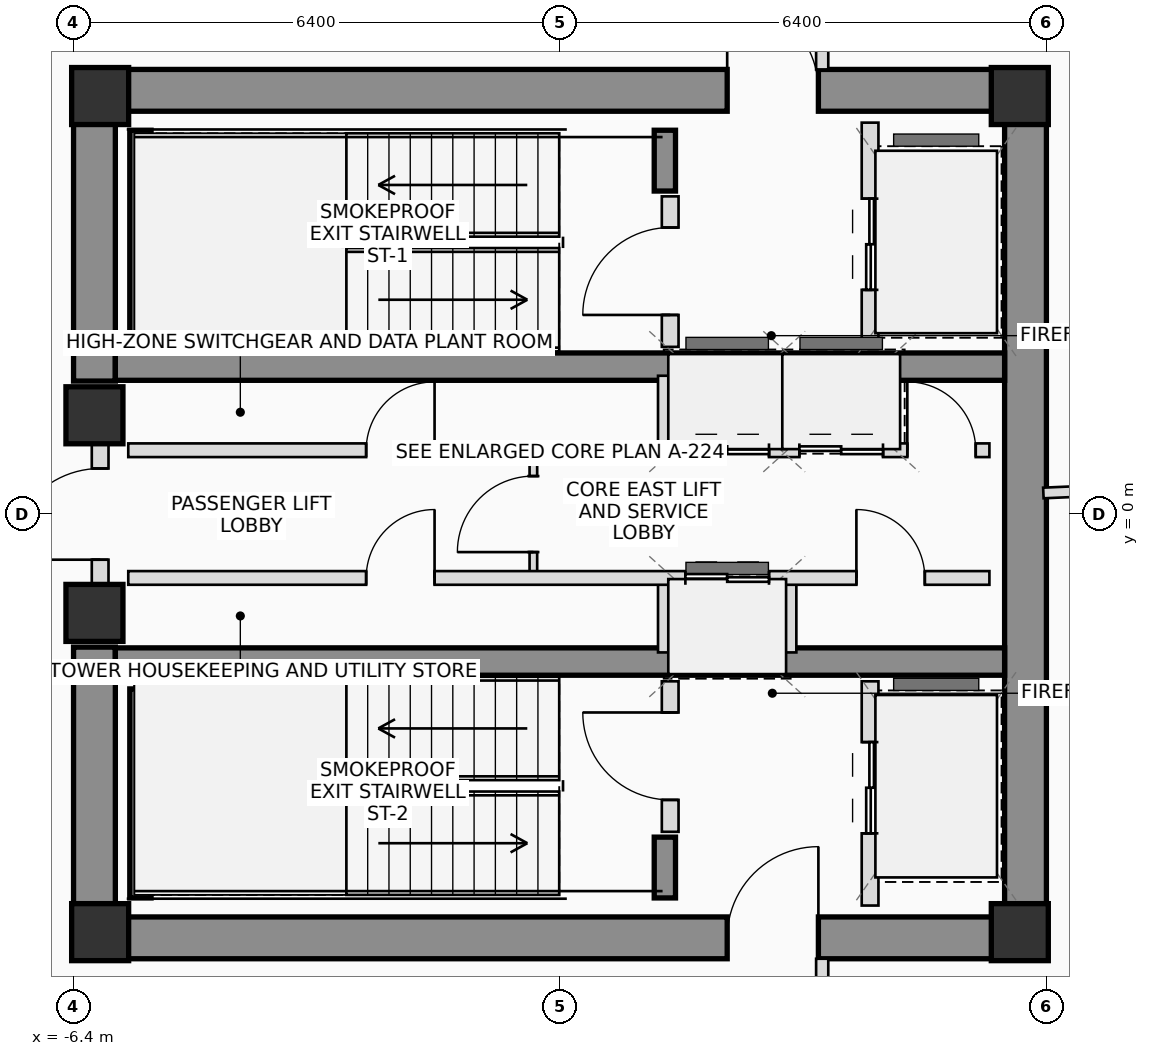
"""IFC4 building model, lengths in metres.
Left out: names, types, materials, properties, quantities, classifications, styles, units other than length and angle.
Written with IfcOpenShell. Run it as: python <this file> out.ifc"""

import sys

from ifc_helpers import new_model, si_unit, direction, frame, frame_2d, origin, origin_2d, place, context, subcontext, project, spatial, rectangle, extrude, source, transform, mapped, element, fill, save


model = new_model("IFC4")
c1 = context("Model", 3, precision=1e-05, world=origin(), true_north=direction((0.0, 1.0)))
c2 = subcontext(c1, "Body", "Model", "MODEL_VIEW")
j1 = project(units=[si_unit("LENGTHUNIT", "METRE"), si_unit("PLANEANGLEUNIT", "RADIAN")], contexts=[c1])
p1 = place(None, origin())
s1 = spatial("IfcSite", under=j1, at=p1, CompositionType="ELEMENT")
p2 = place(p1, origin())
s2 = spatial("IfcBuilding", under=s1, at=p2, CompositionType="ELEMENT")
p3 = place(p2, frame((0.0, 0.0, 264.35)))
s3 = spatial("IfcBuildingStorey", under=s2, at=p3, CompositionType="ELEMENT", Elevation=264.35)
m1 = source(origin(), c2, "Body", "SweptSolid", [
    extrude(rectangle(XDim=0.75, YDim=0.75, at=origin_2d()), origin(), (0.0, 0.0, 1.0), 3.4),
])
for number, where, z_axis, x_axis in (
    (1, (-6.05, -5.5, 0.0), (0.0, 0.0, 1.0), (1.0, 0.0, 0.0)),
    (2, (6.05, -5.5, 0.0), (0.0, 0.0, 1.0), (1.0, 0.0, 0.0)),
    (3, (6.05, 5.5, 0.0), (0.0, 0.0, 1.0), (1.0, 0.0, 0.0)),
    (4, (-6.05, 5.5, 0.0), (0.0, 0.0, 1.0), (1.0, 0.0, 0.0)),
):
    element("IfcColumn", number, at=place(p3, frame(where, z_axis=z_axis, x_axis=x_axis)), inside=s3, PredefinedType="COLUMN", context=c2, shape_type="MappedRepresentation", body=[
        mapped(m1, transform((0.0, 0.0, 0.0), scale=1.0)),
    ])
p4 = place(p3, frame((-6.4, 5.575, 0.0), z_axis=(0.0, 0.0, 1.0), x_axis=(1.0, 0.0, 0.0)))
e5 = element("IfcWall", 5, at=p4, inside=s3, PredefinedType="SHEAR", context=c2, shape_type="SweptSolid", body=[
    extrude(rectangle(XDim=12.8, YDim=0.55, at=frame_2d((6.4, 0.0))), origin(), (0.0, 0.0, 1.0), 3.4),
])
p5 = place(p4, frame((8.6, 0.0, 0.0)))
e6 = element("IfcOpeningElement", 6, at=p5, cuts=e5, PredefinedType="OPENING", context=c2, shape_type="SweptSolid", body=[
    extrude(rectangle(XDim=1.2, YDim=2.2, at=frame_2d((0.6, 1.1))), frame((0.0, 0.285, 0.0), z_axis=(0.0, -1.0, 0.0), x_axis=(1.0, 0.0, 0.0)), (0.0, 0.0, 1.0), 0.57),
])
p6 = place(p3, frame((-6.4, -5.575, 0.0), z_axis=(0.0, 0.0, 1.0), x_axis=(1.0, 0.0, 0.0)))
e7 = element("IfcWall", 7, at=p6, inside=s3, PredefinedType="SHEAR", context=c2, shape_type="SweptSolid", body=[
    extrude(rectangle(XDim=12.8, YDim=0.55, at=frame_2d((6.4, 0.0))), origin(), (0.0, 0.0, 1.0), 3.4),
])
p7 = place(p6, frame((8.6, 0.0, 0.0)))
e8 = element("IfcOpeningElement", 8, at=p7, cuts=e7, PredefinedType="OPENING", context=c2, shape_type="SweptSolid", body=[
    extrude(rectangle(XDim=1.2, YDim=2.2, at=frame_2d((0.6, 1.1))), frame((0.0, 0.285, 0.0), z_axis=(0.0, -1.0, 0.0), x_axis=(1.0, 0.0, 0.0)), (0.0, 0.0, 1.0), 0.57),
])
p8 = place(p3, frame((6.125, -5.3, 0.0), z_axis=(0.0, 0.0, 1.0), x_axis=(0.0, 1.0, 0.0)))
e9 = element("IfcWall", 9, at=p8, inside=s3, PredefinedType="SHEAR", context=c2, shape_type="SweptSolid", body=[
    extrude(rectangle(XDim=10.6, YDim=0.55, at=frame_2d((5.3, 0.0))), origin(), (0.0, 0.0, 1.0), 3.4),
])
for number, where, z_axis, x_axis in (
    (10, (-6.125, -5.3, 0.0), (0.0, 0.0, 1.0), (0.0, 1.0, 0.0)),
    (11, (-6.125, 1.75, 0.0), (0.0, 0.0, 1.0), (0.0, 1.0, 0.0)),
):
    element("IfcWall", number, at=place(p3, frame(where, z_axis=z_axis, x_axis=x_axis)), inside=s3, PredefinedType="SHEAR", context=c2, shape_type="SweptSolid", body=[
        extrude(rectangle(XDim=3.55, YDim=0.55, at=frame_2d((1.775, 0.0))), origin(), (0.0, 0.0, 1.0), 3.4),
    ])
for number, where, z_axis, x_axis in (
    (12, (-5.85, 1.94, 0.0), (0.0, 0.0, 1.0), (1.0, 0.0, 0.0)),
    (13, (-5.85, -1.94, 0.0), (0.0, 0.0, 1.0), (1.0, 0.0, 0.0)),
):
    element("IfcWall", number, at=place(p3, frame(where, z_axis=z_axis, x_axis=x_axis)), inside=s3, PredefinedType="SHEAR", context=c2, shape_type="SweptSolid", body=[
        extrude(rectangle(XDim=11.7, YDim=0.36, at=frame_2d((5.85, 0.0))), origin(), (0.0, 0.0, 1.0), 3.4),
    ])
p9 = place(p3, frame((-5.52, 2.3, 0.0), z_axis=(0.0, 0.0, 1.0), x_axis=(0.0, 1.0, 0.0)))
e14 = element("IfcWall", 14, at=p9, inside=s3, PredefinedType="SHEAR", context=c2, shape_type="SweptSolid", body=[
    extrude(rectangle(XDim=2.75, YDim=0.28, at=frame_2d((1.375, 0.0))), origin(), (0.0, 0.0, 1.0), 3.4),
])
p10 = place(p3, frame((1.38, 4.25, 0.0), z_axis=(0.0, 0.0, 1.0), x_axis=(0.0, 1.0, 0.0)))
e15 = element("IfcWall", 15, at=p10, inside=s3, PredefinedType="SHEAR", context=c2, shape_type="SweptSolid", body=[
    extrude(rectangle(XDim=0.8, YDim=0.28, at=frame_2d((0.4, 0.0))), origin(), (0.0, 0.0, 1.0), 3.4),
])
p11 = place(p3, frame((-5.52, -5.05, 0.0), z_axis=(0.0, 0.0, 1.0), x_axis=(0.0, 1.0, 0.0)))
e16 = element("IfcWall", 16, at=p11, inside=s3, PredefinedType="SHEAR", context=c2, shape_type="SweptSolid", body=[
    extrude(rectangle(XDim=2.75, YDim=0.28, at=frame_2d((1.375, 0.0))), origin(), (0.0, 0.0, 1.0), 3.4),
])
p12 = place(p3, frame((1.38, -5.05, 0.0), z_axis=(0.0, 0.0, 1.0), x_axis=(0.0, 1.0, 0.0)))
e17 = element("IfcWall", 17, at=p12, inside=s3, PredefinedType="SHEAR", context=c2, shape_type="SweptSolid", body=[
    extrude(rectangle(XDim=0.8, YDim=0.28, at=frame_2d((0.4, 0.0))), origin(), (0.0, 0.0, 1.0), 3.4),
])
for number, where, z_axis, x_axis in (
    (18, (-6.125, -1.3, 0.0), (0.0, 0.0, 1.0), (1.0, 0.0, 0.0)),
    (19, (-6.125, 1.3, 0.0), (0.0, 0.0, 1.0), (1.0, 0.0, 0.0)),
):
    element("IfcColumn", number, at=place(p3, frame(where, z_axis=z_axis, x_axis=x_axis)), inside=s3, PredefinedType="COLUMN", context=c2, shape_type="MappedRepresentation", body=[
        mapped(m1, transform((0.0, 0.0, 0.0), scale=1.0)),
    ])
p13 = place(p3, frame((-6.05, -0.95, 0.0), z_axis=(0.0, 0.0, 1.0), x_axis=(0.0, 1.0, 0.0)))
e20 = element("IfcWall", 20, at=p13, inside=s3, PredefinedType="PLUMBINGWALL", context=c2, shape_type="SweptSolid", body=[
    extrude(rectangle(XDim=1.9, YDim=0.22, at=frame_2d((0.95, 0.0))), origin(), (0.0, 0.0, 1.0), 2.18),
])
p14 = place(p13, frame((0.35, 0.0, 0.0)))
e21 = element("IfcOpeningElement", 21, at=p14, cuts=e20, PredefinedType="OPENING", context=c2, shape_type="SweptSolid", body=[
    extrude(rectangle(XDim=1.2, YDim=2.2, at=frame_2d((0.6, 1.1))), frame((0.0, 0.12, 0.0), z_axis=(0.0, -1.0, 0.0), x_axis=(1.0, 0.0, 0.0)), (0.0, 0.0, 1.0), 0.24),
])
p15 = place(p3, frame((1.45, 2.2, 0.0), z_axis=(0.0, 0.0, 1.0), x_axis=(0.0, 1.0, 0.0)))
e22 = element("IfcWall", 22, at=p15, inside=s3, PredefinedType="PLUMBINGWALL", context=c2, shape_type="SweptSolid", body=[
    extrude(rectangle(XDim=1.98, YDim=0.22, at=frame_2d((0.99, 0.0))), origin(), (0.0, 0.0, 1.0), 3.2),
])
p16 = place(p15, frame((0.42, 0.0, 0.0)))
e23 = element("IfcOpeningElement", 23, at=p16, cuts=e22, PredefinedType="OPENING", context=c2, shape_type="SweptSolid", body=[
    extrude(rectangle(XDim=1.15, YDim=2.15, at=frame_2d((0.575, 1.075))), frame((0.0, 0.12, 0.0), z_axis=(0.0, -1.0, 0.0), x_axis=(1.0, 0.0, 0.0)), (0.0, 0.0, 1.0), 0.24),
])
p17 = place(p3, frame((4.08, 2.2, 0.0), z_axis=(0.0, 0.0, 1.0), x_axis=(0.0, 1.0, 0.0)))
e24 = element("IfcWall", 24, at=p17, inside=s3, PredefinedType="PLUMBINGWALL", context=c2, shape_type="SweptSolid", body=[
    extrude(rectangle(XDim=2.95, YDim=0.22, at=frame_2d((1.475, 0.0))), origin(), (0.0, 0.0, 1.0), 3.2),
])
p18 = place(p17, frame((0.75, 0.0, 0.0)))
e25 = element("IfcOpeningElement", 25, at=p18, cuts=e24, PredefinedType="OPENING", context=c2, shape_type="SweptSolid", body=[
    extrude(rectangle(XDim=1.2, YDim=2.25, at=frame_2d((0.6, 1.125))), frame((0.0, 0.12, 0.0), z_axis=(0.0, -1.0, 0.0), x_axis=(1.0, 0.0, 0.0)), (0.0, 0.0, 1.0), 0.24),
])
p19 = place(p3, frame((1.45, -4.18, 0.0), z_axis=(0.0, 0.0, 1.0), x_axis=(0.0, 1.0, 0.0)))
e26 = element("IfcWall", 26, at=p19, inside=s3, PredefinedType="PLUMBINGWALL", context=c2, shape_type="SweptSolid", body=[
    extrude(rectangle(XDim=1.98, YDim=0.22, at=frame_2d((0.99, 0.0))), origin(), (0.0, 0.0, 1.0), 3.2),
])
p20 = place(p19, frame((0.42, 0.0, 0.0)))
e27 = element("IfcOpeningElement", 27, at=p20, cuts=e26, PredefinedType="OPENING", context=c2, shape_type="SweptSolid", body=[
    extrude(rectangle(XDim=1.15, YDim=2.15, at=frame_2d((0.575, 1.075))), frame((0.0, 0.12, 0.0), z_axis=(0.0, -1.0, 0.0), x_axis=(1.0, 0.0, 0.0)), (0.0, 0.0, 1.0), 0.24),
])
p21 = place(p3, frame((4.08, -5.15, 0.0), z_axis=(0.0, 0.0, 1.0), x_axis=(0.0, 1.0, 0.0)))
e28 = element("IfcWall", 28, at=p21, inside=s3, PredefinedType="PLUMBINGWALL", context=c2, shape_type="SweptSolid", body=[
    extrude(rectangle(XDim=2.95, YDim=0.22, at=frame_2d((1.475, 0.0))), origin(), (0.0, 0.0, 1.0), 3.2),
])
p22 = place(p21, frame((0.95, 0.0, 0.0)))
e29 = element("IfcOpeningElement", 29, at=p22, cuts=e28, PredefinedType="OPENING", context=c2, shape_type="SweptSolid", body=[
    extrude(rectangle(XDim=1.2, YDim=2.25, at=frame_2d((0.6, 1.125))), frame((0.0, 0.12, 0.0), z_axis=(0.0, -1.0, 0.0), x_axis=(1.0, 0.0, 0.0)), (0.0, 0.0, 1.0), 0.24),
])
p23 = place(p3, frame((-0.35, -0.84, 0.0), z_axis=(0.0, 0.0, 1.0), x_axis=(0.0, 1.0, 0.0)))
e30 = element("IfcWall", 30, at=p23, inside=s3, PredefinedType="PARTITIONING", context=c2, shape_type="SweptSolid", body=[
    extrude(rectangle(XDim=1.68, YDim=0.1, at=frame_2d((0.84, 0.0))), origin(), (0.0, 0.0, 1.0), 3.2),
])
p24 = place(p23, frame((0.34, 0.0, 0.0)))
e31 = element("IfcOpeningElement", 31, at=p24, cuts=e30, PredefinedType="OPENING", context=c2, shape_type="SweptSolid", body=[
    extrude(rectangle(XDim=1.0, YDim=2.25, at=frame_2d((0.5, 1.125))), frame((0.0, 0.06, 0.0), z_axis=(0.0, -1.0, 0.0), x_axis=(1.0, 0.0, 0.0)), (0.0, 0.0, 1.0), 0.12),
])
for number, where, z_axis, x_axis in (
    (32, (1.38, 0.84, 0.0), (0.0, 0.0, 1.0), (0.0, 1.0, 0.0)),
    (33, (1.38, -1.82, 0.0), (0.0, 0.0, 1.0), (0.0, 1.0, 0.0)),
    (34, (3.02, 0.84, 0.0), (0.0, 0.0, 1.0), (0.0, 1.0, 0.0)),
    (35, (4.38, 0.84, 0.0), (0.0, 0.0, 1.0), (0.0, 1.0, 0.0)),
    (36, (3.02, -1.82, 0.0), (0.0, 0.0, 1.0), (0.0, 1.0, 0.0)),
):
    element("IfcWall", number, at=place(p3, frame(where, z_axis=z_axis, x_axis=x_axis)), inside=s3, PredefinedType="PLUMBINGWALL", context=c2, shape_type="SweptSolid", body=[
        extrude(rectangle(XDim=0.98, YDim=0.18, at=frame_2d((0.49, 0.0))), origin(), (0.0, 0.0, 1.0), 3.2),
    ])
p25 = place(p3, frame((-5.68, 0.84, 0.0), z_axis=(0.0, 0.0, 1.0), x_axis=(1.0, 0.0, 0.0)))
e37 = element("IfcWall", 37, at=p25, inside=s3, PredefinedType="PLUMBINGWALL", context=c2, shape_type="SweptSolid", body=[
    extrude(rectangle(XDim=11.33, YDim=0.18, at=frame_2d((5.665, 0.0))), origin(), (0.0, 0.0, 1.0), 3.2),
])
p26 = place(p25, frame((3.13, 0.0, 0.0)))
e38 = element("IfcOpeningElement", 38, at=p26, cuts=e37, PredefinedType="OPENING", context=c2, shape_type="SweptSolid", body=[
    extrude(rectangle(XDim=0.9, YDim=2.05, at=frame_2d((0.45, 1.025))), frame((0.0, 0.1, 0.0), z_axis=(0.0, -1.0, 0.0), x_axis=(1.0, 0.0, 0.0)), (0.0, 0.0, 1.0), 0.2),
])
p27 = place(p25, frame((7.33, 0.0, 0.0)))
e39 = element("IfcOpeningElement", 39, at=p27, cuts=e37, PredefinedType="OPENING", context=c2, shape_type="SweptSolid", body=[
    extrude(rectangle(XDim=1.1, YDim=2.2, at=frame_2d((0.55, 1.1))), frame((0.0, 0.1, 0.0), z_axis=(0.0, -1.0, 0.0), x_axis=(1.0, 0.0, 0.0)), (0.0, 0.0, 1.0), 0.2),
])
p28 = place(p25, frame((8.83, 0.0, 0.0)))
e40 = element("IfcOpeningElement", 40, at=p28, cuts=e37, PredefinedType="OPENING", context=c2, shape_type="SweptSolid", body=[
    extrude(rectangle(XDim=1.1, YDim=2.2, at=frame_2d((0.55, 1.1))), frame((0.0, 0.1, 0.0), z_axis=(0.0, -1.0, 0.0), x_axis=(1.0, 0.0, 0.0)), (0.0, 0.0, 1.0), 0.2),
])
p29 = place(p25, frame((10.25, 0.0, 0.0)))
e41 = element("IfcOpeningElement", 41, at=p29, cuts=e37, PredefinedType="OPENING", context=c2, shape_type="SweptSolid", body=[
    extrude(rectangle(XDim=0.9, YDim=2.05, at=frame_2d((0.45, 1.025))), frame((0.0, 0.1, 0.0), z_axis=(0.0, -1.0, 0.0), x_axis=(1.0, 0.0, 0.0)), (0.0, 0.0, 1.0), 0.2),
])
p30 = place(p3, frame((-5.68, -0.84, 0.0), z_axis=(0.0, 0.0, 1.0), x_axis=(1.0, 0.0, 0.0)))
e42 = element("IfcWall", 42, at=p30, inside=s3, PredefinedType="PLUMBINGWALL", context=c2, shape_type="SweptSolid", body=[
    extrude(rectangle(XDim=11.33, YDim=0.18, at=frame_2d((5.665, 0.0))), origin(), (0.0, 0.0, 1.0), 3.2),
])
p31 = place(p30, frame((3.13, 0.0, 0.0)))
e43 = element("IfcOpeningElement", 43, at=p31, cuts=e42, PredefinedType="OPENING", context=c2, shape_type="SweptSolid", body=[
    extrude(rectangle(XDim=0.9, YDim=2.05, at=frame_2d((0.45, 1.025))), frame((0.0, 0.1, 0.0), z_axis=(0.0, -1.0, 0.0), x_axis=(1.0, 0.0, 0.0)), (0.0, 0.0, 1.0), 0.2),
])
p32 = place(p30, frame((7.33, 0.0, 0.0)))
e44 = element("IfcOpeningElement", 44, at=p32, cuts=e42, PredefinedType="OPENING", context=c2, shape_type="SweptSolid", body=[
    extrude(rectangle(XDim=1.1, YDim=2.2, at=frame_2d((0.55, 1.1))), frame((0.0, 0.1, 0.0), z_axis=(0.0, -1.0, 0.0), x_axis=(1.0, 0.0, 0.0)), (0.0, 0.0, 1.0), 0.2),
])
p33 = place(p30, frame((9.58, 0.0, 0.0)))
e45 = element("IfcOpeningElement", 45, at=p33, cuts=e42, PredefinedType="OPENING", context=c2, shape_type="SweptSolid", body=[
    extrude(rectangle(XDim=0.9, YDim=2.05, at=frame_2d((0.45, 1.025))), frame((0.0, 0.1, 0.0), z_axis=(0.0, -1.0, 0.0), x_axis=(1.0, 0.0, 0.0)), (0.0, 0.0, 1.0), 0.2),
])
p34 = place(p3, frame((3.45, 7.49, 0.0), z_axis=(0.0, 0.0, 1.0), x_axis=(0.0, -1.0, 0.0)))
e46 = element("IfcWall", 46, at=p34, inside=s3, PredefinedType="PARTITIONING", context=c2, shape_type="SweptSolid", body=[
    extrude(rectangle(XDim=1.64, YDim=0.16, at=frame_2d((0.82, 0.0))), origin(), (0.0, 0.0, 1.0), 2.805),
])
p35 = place(p3, frame((3.45, -5.85, 0.0), z_axis=(0.0, 0.0, 1.0), x_axis=(0.0, -1.0, 0.0)))
e47 = element("IfcWall", 47, at=p35, inside=s3, PredefinedType="PARTITIONING", context=c2, shape_type="SweptSolid", body=[
    extrude(rectangle(XDim=1.64, YDim=0.16, at=frame_2d((0.82, 0.0))), origin(), (0.0, 0.0, 1.0), 3.2),
])
p36 = place(p35, frame((0.32, 0.0, 0.0)))
e48 = element("IfcOpeningElement", 48, at=p36, cuts=e47, PredefinedType="OPENING", context=c2, shape_type="SweptSolid", body=[
    extrude(rectangle(XDim=1.0, YDim=2.25, at=frame_2d((0.5, 1.125))), frame((0.0, 0.09, 0.0), z_axis=(0.0, -1.0, 0.0), x_axis=(1.0, 0.0, 0.0)), (0.0, 0.0, 1.0), 0.18),
])
p37 = place(p3, frame((6.36, 0.278, 0.0), z_axis=(0.0, 0.0, 1.0), x_axis=(0.999047617824, 0.043633213494, 0.0)))
e49 = element("IfcWall", 49, at=p37, inside=s3, PredefinedType="PARTITIONING", context=c2, shape_type="SweptSolid", body=[
    extrude(rectangle(XDim=13.406, YDim=0.14, at=frame_2d((6.703, 0.0))), origin(), (0.0, 0.0, 1.0), 2.605),
])
p38 = place(p5, origin())
e50 = element("IfcDoor", 50, at=p38, inside=s3, OperationType="SINGLE_SWING_LEFT", PredefinedType="DOOR", context=c2, shape_type="SweptSolid", body=[
    extrude(rectangle(XDim=1.2, YDim=2.2, at=frame_2d((0.6, 1.1))), frame((0.0, 0.025, 0.0), z_axis=(0.0, -1.0, 0.0), x_axis=(1.0, 0.0, 0.0)), (0.0, 0.0, 1.0), 0.05),
])
fill(e6, e50)
p39 = place(p7, origin())
e51 = element("IfcDoor", 51, at=p39, inside=s3, OperationType="SINGLE_SWING_RIGHT", PredefinedType="DOOR", context=c2, shape_type="SweptSolid", body=[
    extrude(rectangle(XDim=1.2, YDim=2.2, at=frame_2d((0.6, 1.1))), frame((0.0, 0.025, 0.0), z_axis=(0.0, -1.0, 0.0), x_axis=(1.0, 0.0, 0.0)), (0.0, 0.0, 1.0), 0.05),
])
fill(e8, e51)
p40 = place(p14, origin())
e52 = element("IfcDoor", 52, at=p40, inside=s3, OperationType="SINGLE_SWING_LEFT", PredefinedType="DOOR", context=c2, shape_type="SweptSolid", body=[
    extrude(rectangle(XDim=1.2, YDim=2.2, at=frame_2d((0.6, 1.1))), frame((0.0, 0.025, 0.0), z_axis=(0.0, -1.0, 0.0), x_axis=(1.0, 0.0, 0.0)), (0.0, 0.0, 1.0), 0.05),
])
fill(e21, e52)
p41 = place(p16, origin())
e53 = element("IfcDoor", 53, at=p41, inside=s3, OperationType="SINGLE_SWING_LEFT", PredefinedType="DOOR", context=c2, shape_type="SweptSolid", body=[
    extrude(rectangle(XDim=1.15, YDim=2.15, at=frame_2d((0.575, 1.075))), frame((0.0, 0.025, 0.0), z_axis=(0.0, -1.0, 0.0), x_axis=(1.0, 0.0, 0.0)), (0.0, 0.0, 1.0), 0.05),
])
fill(e23, e53)
p42 = place(p18, origin())
e54 = element("IfcDoor", 54, at=p42, inside=s3, OperationType="DOUBLE_DOOR_SLIDING", PredefinedType="DOOR", context=c2, shape_type="SweptSolid", body=[
    extrude(rectangle(XDim=1.2, YDim=2.25, at=frame_2d((0.6, 1.125))), frame((0.0, 0.025, 0.0), z_axis=(0.0, -1.0, 0.0), x_axis=(1.0, 0.0, 0.0)), (0.0, 0.0, 1.0), 0.05),
])
fill(e25, e54)
p43 = place(p20, origin())
e55 = element("IfcDoor", 55, at=p43, inside=s3, OperationType="SINGLE_SWING_RIGHT", PredefinedType="DOOR", context=c2, shape_type="SweptSolid", body=[
    extrude(rectangle(XDim=1.15, YDim=2.15, at=frame_2d((0.575, 1.075))), frame((0.0, 0.025, 0.0), z_axis=(0.0, -1.0, 0.0), x_axis=(1.0, 0.0, 0.0)), (0.0, 0.0, 1.0), 0.05),
])
fill(e27, e55)
p44 = place(p22, origin())
e56 = element("IfcDoor", 56, at=p44, inside=s3, OperationType="DOUBLE_DOOR_SLIDING", PredefinedType="DOOR", context=c2, shape_type="SweptSolid", body=[
    extrude(rectangle(XDim=1.2, YDim=2.25, at=frame_2d((0.6, 1.125))), frame((0.0, 0.025, 0.0), z_axis=(0.0, -1.0, 0.0), x_axis=(1.0, 0.0, 0.0)), (0.0, 0.0, 1.0), 0.05),
])
fill(e29, e56)
p45 = place(p24, origin())
e57 = element("IfcDoor", 57, at=p45, inside=s3, OperationType="SINGLE_SWING_LEFT", PredefinedType="DOOR", context=c2, shape_type="SweptSolid", body=[
    extrude(rectangle(XDim=1.0, YDim=2.25, at=frame_2d((0.5, 1.125))), frame((0.0, 0.025, 0.0), z_axis=(0.0, -1.0, 0.0), x_axis=(1.0, 0.0, 0.0)), (0.0, 0.0, 1.0), 0.05),
])
fill(e31, e57)
p46 = place(p26, origin())
e58 = element("IfcDoor", 58, at=p46, inside=s3, OperationType="SINGLE_SWING_RIGHT", PredefinedType="DOOR", context=c2, shape_type="SweptSolid", body=[
    extrude(rectangle(XDim=0.9, YDim=2.05, at=frame_2d((0.45, 1.025))), frame((0.0, 0.025, 0.0), z_axis=(0.0, -1.0, 0.0), x_axis=(1.0, 0.0, 0.0)), (0.0, 0.0, 1.0), 0.05),
])
fill(e38, e58)
p47 = place(p27, origin())
e59 = element("IfcDoor", 59, at=p47, inside=s3, OperationType="DOUBLE_DOOR_SLIDING", PredefinedType="DOOR", context=c2, shape_type="SweptSolid", body=[
    extrude(rectangle(XDim=1.1, YDim=2.2, at=frame_2d((0.55, 1.1))), frame((0.0, 0.025, 0.0), z_axis=(0.0, -1.0, 0.0), x_axis=(1.0, 0.0, 0.0)), (0.0, 0.0, 1.0), 0.05),
])
fill(e39, e59)
p48 = place(p28, origin())
e60 = element("IfcDoor", 60, at=p48, inside=s3, OperationType="DOUBLE_DOOR_SLIDING", PredefinedType="DOOR", context=c2, shape_type="SweptSolid", body=[
    extrude(rectangle(XDim=1.1, YDim=2.2, at=frame_2d((0.55, 1.1))), frame((0.0, 0.025, 0.0), z_axis=(0.0, -1.0, 0.0), x_axis=(1.0, 0.0, 0.0)), (0.0, 0.0, 1.0), 0.05),
])
fill(e40, e60)
p49 = place(p29, origin())
e61 = element("IfcDoor", 61, at=p49, inside=s3, OperationType="SINGLE_SWING_LEFT", PredefinedType="DOOR", context=c2, shape_type="SweptSolid", body=[
    extrude(rectangle(XDim=0.9, YDim=2.05, at=frame_2d((0.45, 1.025))), frame((0.0, 0.025, 0.0), z_axis=(0.0, -1.0, 0.0), x_axis=(1.0, 0.0, 0.0)), (0.0, 0.0, 1.0), 0.05),
])
fill(e41, e61)
p50 = place(p31, origin())
e62 = element("IfcDoor", 62, at=p50, inside=s3, OperationType="SINGLE_SWING_RIGHT", PredefinedType="DOOR", context=c2, shape_type="SweptSolid", body=[
    extrude(rectangle(XDim=0.9, YDim=2.05, at=frame_2d((0.45, 1.025))), frame((0.0, 0.025, 0.0), z_axis=(0.0, -1.0, 0.0), x_axis=(1.0, 0.0, 0.0)), (0.0, 0.0, 1.0), 0.05),
])
fill(e43, e62)
p51 = place(p32, origin())
e63 = element("IfcDoor", 63, at=p51, inside=s3, OperationType="DOUBLE_DOOR_SLIDING", PredefinedType="DOOR", context=c2, shape_type="SweptSolid", body=[
    extrude(rectangle(XDim=1.1, YDim=2.2, at=frame_2d((0.55, 1.1))), frame((0.0, 0.025, 0.0), z_axis=(0.0, -1.0, 0.0), x_axis=(1.0, 0.0, 0.0)), (0.0, 0.0, 1.0), 0.05),
])
fill(e44, e63)
p52 = place(p33, origin())
e64 = element("IfcDoor", 64, at=p52, inside=s3, OperationType="SINGLE_SWING_LEFT", PredefinedType="DOOR", context=c2, shape_type="SweptSolid", body=[
    extrude(rectangle(XDim=0.9, YDim=2.05, at=frame_2d((0.45, 1.025))), frame((0.0, 0.025, 0.0), z_axis=(0.0, -1.0, 0.0), x_axis=(1.0, 0.0, 0.0)), (0.0, 0.0, 1.0), 0.05),
])
fill(e45, e64)
save(model, sys.argv[1])
